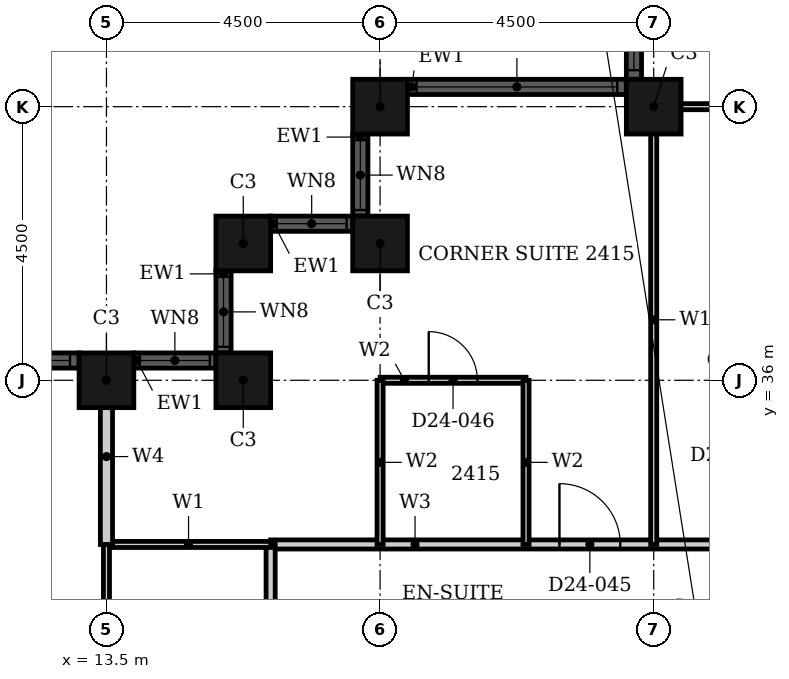
"""IFC4 building model, lengths in metres.
Left out: names, types, materials, properties, quantities, classifications, styles, units other than length and angle.
Written with IfcOpenShell. Run it as: python <this file> out.ifc"""

import sys

from ifc_helpers import new_model, si_unit, direction, frame, frame_2d, origin, origin_2d, place, context, subcontext, project, spatial, rectangle, hollow_rectangle, extrude, element, fill, save


model = new_model("IFC4")
c1 = context("Model", 3, precision=1e-05, world=origin(), true_north=direction((0.0, 1.0)))
c2 = subcontext(c1, "Body", "Model", "MODEL_VIEW")
j1 = project(units=[si_unit("LENGTHUNIT", "METRE"), si_unit("PLANEANGLEUNIT", "RADIAN")], contexts=[c1])
p1 = place(None, origin())
s1 = spatial("IfcSite", under=j1, at=p1, CompositionType="ELEMENT")
p2 = place(p1, origin())
s2 = spatial("IfcBuilding", under=s1, at=p2, CompositionType="ELEMENT")
p3 = place(p2, frame((0.0, 0.0, 100.8)))
s3 = spatial("IfcBuildingStorey", under=s2, at=p3, CompositionType="ELEMENT", Elevation=100.8)
for number, where, z_axis, x_axis in (
    (1, (22.5, 40.5, 0.0), (0.0, 0.0, 1.0), (1.0, 0.0, 0.0)),
    (2, (18.0, 40.5, 0.0), (0.0, 0.0, 1.0), (1.0, 0.0, 0.0)),
    (3, (18.0, 38.25, 0.0), (0.0, 0.0, 1.0), (1.0, 0.0, 0.0)),
    (4, (15.75, 38.25, 0.0), (0.0, 0.0, 1.0), (1.0, 0.0, 0.0)),
    (5, (15.75, 36.0, 0.0), (0.0, 0.0, 1.0), (1.0, 0.0, 0.0)),
    (6, (13.5, 36.0, 0.0), (0.0, 0.0, 1.0), (1.0, 0.0, 0.0)),
):
    element("IfcColumn", number, at=place(p3, frame(where, z_axis=z_axis, x_axis=x_axis)), inside=s3, PredefinedType="COLUMN", context=c2, shape_type="SweptSolid", body=[
        extrude(hollow_rectangle(XDim=0.9, YDim=0.9, WallThickness=0.028, at=origin_2d()), origin(), (0.0, 0.0, 1.0), 3.6),
    ])
p4 = place(p3, frame((22.175, 49.05, 0.0), z_axis=(0.0, 0.0, 1.0), x_axis=(0.0, -1.0, 0.0)))
e7 = element("IfcWall", 7, at=p4, inside=s3, PredefinedType="SOLIDWALL", context=c2, shape_type="SweptSolid", body=[
    extrude(rectangle(XDim=8.1, YDim=0.25, at=frame_2d((4.05, 0.0))), origin(), (0.0, 0.0, 1.0), 3.6),
])
p5 = place(p4, frame((0.15, 0.0, 0.9)))
e8 = element("IfcOpeningElement", 8, at=p5, cuts=e7, PredefinedType="OPENING", context=c2, shape_type="SweptSolid", body=[
    extrude(rectangle(XDim=3.3, YDim=2.08, at=frame_2d((1.65, 1.04))), frame((0.0, 0.135, 0.0), z_axis=(0.0, -1.0, 0.0), x_axis=(1.0, 0.0, 0.0)), (0.0, 0.0, 1.0), 0.27),
])
p6 = place(p4, frame((4.65, 0.0, 0.9)))
e9 = element("IfcOpeningElement", 9, at=p6, cuts=e7, PredefinedType="OPENING", context=c2, shape_type="SweptSolid", body=[
    extrude(rectangle(XDim=3.3, YDim=2.08, at=frame_2d((1.65, 1.04))), frame((0.0, 0.135, 0.0), z_axis=(0.0, -1.0, 0.0), x_axis=(1.0, 0.0, 0.0)), (0.0, 0.0, 1.0), 0.27),
])
p7 = place(p3, frame((22.05, 40.825, 0.0), z_axis=(0.0, 0.0, 1.0), x_axis=(-1.0, 0.0, 0.0)))
e10 = element("IfcWall", 10, at=p7, inside=s3, PredefinedType="SOLIDWALL", context=c2, shape_type="SweptSolid", body=[
    extrude(rectangle(XDim=3.6, YDim=0.25, at=frame_2d((1.8, 0.0))), origin(), (0.0, 0.0, 1.0), 3.6),
])
p8 = place(p7, frame((0.15, 0.0, 0.9)))
e11 = element("IfcOpeningElement", 11, at=p8, cuts=e10, PredefinedType="OPENING", context=c2, shape_type="SweptSolid", body=[
    extrude(rectangle(XDim=3.3, YDim=2.08, at=frame_2d((1.65, 1.04))), frame((0.0, 0.135, 0.0), z_axis=(0.0, -1.0, 0.0), x_axis=(1.0, 0.0, 0.0)), (0.0, 0.0, 1.0), 0.27),
])
p9 = place(p3, frame((17.675, 40.05, 0.0), z_axis=(0.0, 0.0, 1.0), x_axis=(0.0, -1.0, 0.0)))
e12 = element("IfcWall", 12, at=p9, inside=s3, PredefinedType="SOLIDWALL", context=c2, shape_type="SweptSolid", body=[
    extrude(rectangle(XDim=1.35, YDim=0.25, at=frame_2d((0.675, 0.0))), origin(), (0.0, 0.0, 1.0), 3.6),
])
p10 = place(p9, frame((0.1, 0.0, 0.9)))
e13 = element("IfcOpeningElement", 13, at=p10, cuts=e12, PredefinedType="OPENING", context=c2, shape_type="SweptSolid", body=[
    extrude(rectangle(XDim=1.15, YDim=2.08, at=frame_2d((0.575, 1.04))), frame((0.0, 0.135, 0.0), z_axis=(0.0, -1.0, 0.0), x_axis=(1.0, 0.0, 0.0)), (0.0, 0.0, 1.0), 0.27),
])
p11 = place(p3, frame((17.55, 38.575, 0.0), z_axis=(0.0, 0.0, 1.0), x_axis=(-1.0, 0.0, 0.0)))
e14 = element("IfcWall", 14, at=p11, inside=s3, PredefinedType="SOLIDWALL", context=c2, shape_type="SweptSolid", body=[
    extrude(rectangle(XDim=1.35, YDim=0.25, at=frame_2d((0.675, 0.0))), origin(), (0.0, 0.0, 1.0), 3.6),
])
p12 = place(p11, frame((0.1, 0.0, 0.9)))
e15 = element("IfcOpeningElement", 15, at=p12, cuts=e14, PredefinedType="OPENING", context=c2, shape_type="SweptSolid", body=[
    extrude(rectangle(XDim=1.15, YDim=2.08, at=frame_2d((0.575, 1.04))), frame((0.0, 0.135, 0.0), z_axis=(0.0, -1.0, 0.0), x_axis=(1.0, 0.0, 0.0)), (0.0, 0.0, 1.0), 0.27),
])
p13 = place(p3, frame((15.425, 37.8, 0.0), z_axis=(0.0, 0.0, 1.0), x_axis=(0.0, -1.0, 0.0)))
e16 = element("IfcWall", 16, at=p13, inside=s3, PredefinedType="SOLIDWALL", context=c2, shape_type="SweptSolid", body=[
    extrude(rectangle(XDim=1.35, YDim=0.25, at=frame_2d((0.675, 0.0))), origin(), (0.0, 0.0, 1.0), 3.6),
])
p14 = place(p13, frame((0.1, 0.0, 0.9)))
e17 = element("IfcOpeningElement", 17, at=p14, cuts=e16, PredefinedType="OPENING", context=c2, shape_type="SweptSolid", body=[
    extrude(rectangle(XDim=1.15, YDim=2.08, at=frame_2d((0.575, 1.04))), frame((0.0, 0.135, 0.0), z_axis=(0.0, -1.0, 0.0), x_axis=(1.0, 0.0, 0.0)), (0.0, 0.0, 1.0), 0.27),
])
p15 = place(p3, frame((15.3, 36.325, 0.0), z_axis=(0.0, 0.0, 1.0), x_axis=(-1.0, 0.0, 0.0)))
e18 = element("IfcWall", 18, at=p15, inside=s3, PredefinedType="SOLIDWALL", context=c2, shape_type="SweptSolid", body=[
    extrude(rectangle(XDim=1.35, YDim=0.25, at=frame_2d((0.675, 0.0))), origin(), (0.0, 0.0, 1.0), 3.6),
])
p16 = place(p15, frame((0.1, 0.0, 0.9)))
e19 = element("IfcOpeningElement", 19, at=p16, cuts=e18, PredefinedType="OPENING", context=c2, shape_type="SweptSolid", body=[
    extrude(rectangle(XDim=1.15, YDim=2.08, at=frame_2d((0.575, 1.04))), frame((0.0, 0.135, 0.0), z_axis=(0.0, -1.0, 0.0), x_axis=(1.0, 0.0, 0.0)), (0.0, 0.0, 1.0), 0.27),
])
p17 = place(p3, frame((13.05, 36.325, 0.0), z_axis=(0.0, 0.0, 1.0), x_axis=(-1.0, 0.0, 0.0)))
e20 = element("IfcWall", 20, at=p17, inside=s3, PredefinedType="SOLIDWALL", context=c2, shape_type="SweptSolid", body=[
    extrude(rectangle(XDim=8.1, YDim=0.25, at=frame_2d((4.05, 0.0))), origin(), (0.0, 0.0, 1.0), 3.6),
])
p18 = place(p17, frame((0.15, 0.0, 0.9)))
e21 = element("IfcOpeningElement", 21, at=p18, cuts=e20, PredefinedType="OPENING", context=c2, shape_type="SweptSolid", body=[
    extrude(rectangle(XDim=3.3, YDim=2.08, at=frame_2d((1.65, 1.04))), frame((0.0, 0.135, 0.0), z_axis=(0.0, -1.0, 0.0), x_axis=(1.0, 0.0, 0.0)), (0.0, 0.0, 1.0), 0.27),
])
p19 = place(p17, frame((4.65, 0.0, 0.9)))
e22 = element("IfcOpeningElement", 22, at=p19, cuts=e20, PredefinedType="OPENING", context=c2, shape_type="SweptSolid", body=[
    extrude(rectangle(XDim=3.3, YDim=2.08, at=frame_2d((1.65, 1.04))), frame((0.0, 0.135, 0.0), z_axis=(0.0, -1.0, 0.0), x_axis=(1.0, 0.0, 0.0)), (0.0, 0.0, 1.0), 0.27),
])
p20 = place(p3, frame((16.2, 33.3, 0.0), z_axis=(0.0, 0.0, 1.0), x_axis=(1.0, 0.0, 0.0)))
e23 = element("IfcWall", 23, at=p20, inside=s3, PredefinedType="PARTITIONING", context=c2, shape_type="SweptSolid", body=[
    extrude(rectangle(XDim=15.3, YDim=0.15, at=frame_2d((7.65, 0.0))), origin(), (0.0, 0.0, 1.0), 3.3),
])
p21 = place(p20, frame((4.75, 0.0, 0.0)))
e24 = element("IfcOpeningElement", 24, at=p21, cuts=e23, PredefinedType="OPENING", context=c2, shape_type="SweptSolid", body=[
    extrude(rectangle(XDim=1.0, YDim=2.1, at=frame_2d((0.5, 1.05))), frame((0.0, 0.085, 0.0), z_axis=(0.0, -1.0, 0.0), x_axis=(1.0, 0.0, 0.0)), (0.0, 0.0, 1.0), 0.17),
])
p22 = place(p20, frame((7.65, 0.0, 0.0)))
e25 = element("IfcOpeningElement", 25, at=p22, cuts=e23, PredefinedType="OPENING", context=c2, shape_type="SweptSolid", body=[
    extrude(rectangle(XDim=0.9, YDim=2.1, at=frame_2d((0.45, 1.05))), frame((0.0, 0.085, 0.0), z_axis=(0.0, -1.0, 0.0), x_axis=(1.0, 0.0, 0.0)), (0.0, 0.0, 1.0), 0.17),
])
p23 = place(p20, frame((12.15, 0.0, 0.0)))
e26 = element("IfcOpeningElement", 26, at=p23, cuts=e23, PredefinedType="OPENING", context=c2, shape_type="SweptSolid", body=[
    extrude(rectangle(XDim=0.9, YDim=2.1, at=frame_2d((0.45, 1.05))), frame((0.0, 0.085, 0.0), z_axis=(0.0, -1.0, 0.0), x_axis=(1.0, 0.0, 0.0)), (0.0, 0.0, 1.0), 0.17),
])
p24 = place(p3, frame((16.2, 27.0, 0.0), z_axis=(0.0, 0.0, 1.0), x_axis=(0.0, 1.0, 0.0)))
e27 = element("IfcWall", 27, at=p24, inside=s3, PredefinedType="PARTITIONING", context=c2, shape_type="SweptSolid", body=[
    extrude(rectangle(XDim=6.3, YDim=0.15, at=frame_2d((3.15, 0.0))), origin(), (0.0, 0.0, 1.0), 3.3),
])
p25 = place(p24, frame((2.55, 0.0, 0.0)))
e28 = element("IfcOpeningElement", 28, at=p25, cuts=e27, PredefinedType="OPENING", context=c2, shape_type="SweptSolid", body=[
    extrude(rectangle(XDim=0.9, YDim=2.1, at=frame_2d((0.45, 1.05))), frame((0.0, 0.085, 0.0), z_axis=(0.0, -1.0, 0.0), x_axis=(1.0, 0.0, 0.0)), (0.0, 0.0, 1.0), 0.17),
])
p26 = place(p3, frame((13.5, 33.3, 0.0), z_axis=(0.0, 0.0, 1.0), x_axis=(1.0, 0.0, 0.0)))
e29 = element("IfcWall", 29, at=p26, inside=s3, PredefinedType="PARTITIONING", context=c2, shape_type="SweptSolid", body=[
    extrude(rectangle(XDim=2.7, YDim=0.1, at=frame_2d((1.35, 0.0))), origin(), (0.0, 0.0, 1.0), 3.3),
])
p27 = place(p3, frame((22.31, 40.5, 0.0), z_axis=(0.0, 0.0, 1.0), x_axis=(1.0, 0.0, 0.0)))
e30 = element("IfcWall", 30, at=p27, inside=s3, PredefinedType="PARTITIONING", context=c2, shape_type="SweptSolid", body=[
    extrude(rectangle(XDim=9.19, YDim=0.1, at=frame_2d((4.595, 0.0))), origin(), (0.0, 0.0, 1.0), 2.38),
])
p28 = place(p3, frame((13.5, 27.0, 0.0), z_axis=(0.0, 0.0, 1.0), x_axis=(0.0, 1.0, 0.0)))
e31 = element("IfcWall", 31, at=p28, inside=s3, PredefinedType="PARTITIONING", context=c2, shape_type="SweptSolid", body=[
    extrude(rectangle(XDim=6.3, YDim=0.1, at=frame_2d((3.15, 0.0))), origin(), (0.0, 0.0, 1.0), 2.38),
])
p29 = place(p3, frame((22.5, 33.3, 0.0), z_axis=(0.0, 0.0, 1.0), x_axis=(0.0, 1.0, 0.0)))
e32 = element("IfcWall", 32, at=p29, inside=s3, PredefinedType="PARTITIONING", context=c2, shape_type="SweptSolid", body=[
    extrude(rectangle(XDim=7.39, YDim=0.1, at=frame_2d((3.695, 0.0))), origin(), (0.0, 0.0, 1.0), 3.3),
])
p30 = place(p3, frame((13.5, 33.3, 0.0), z_axis=(0.0, 0.0, 1.0), x_axis=(0.0, 1.0, 0.0)))
e33 = element("IfcWall", 33, at=p30, inside=s3, PredefinedType="PARTITIONING", context=c2, shape_type="SweptSolid", body=[
    extrude(rectangle(XDim=2.89, YDim=0.2, at=frame_2d((1.445, 0.0))), origin(), (0.0, 0.0, 1.0), 2.38),
])
p31 = place(p3, frame((18.0, 36.0, 0.0), z_axis=(0.0, 0.0, 1.0), x_axis=(1.0, 0.0, 0.0)))
e34 = element("IfcWall", 34, at=p31, inside=s3, PredefinedType="PARTITIONING", context=c2, shape_type="SweptSolid", body=[
    extrude(rectangle(XDim=2.4, YDim=0.1, at=frame_2d((1.2, 0.0))), origin(), (0.0, 0.0, 1.0), 3.3),
])
p32 = place(p31, frame((0.8, 0.0, 0.0)))
e35 = element("IfcOpeningElement", 35, at=p32, cuts=e34, PredefinedType="OPENING", context=c2, shape_type="SweptSolid", body=[
    extrude(rectangle(XDim=0.8, YDim=2.1, at=frame_2d((0.4, 1.05))), frame((0.0, 0.06, 0.0), z_axis=(0.0, -1.0, 0.0), x_axis=(1.0, 0.0, 0.0)), (0.0, 0.0, 1.0), 0.12),
])
for number, where, z_axis, x_axis in (
    (36, (18.0, 33.3, 0.0), (0.0, 0.0, 1.0), (0.0, 1.0, 0.0)),
    (37, (20.4, 33.3, 0.0), (0.0, 0.0, 1.0), (0.0, 1.0, 0.0)),
):
    element("IfcWall", number, at=place(p3, frame(where, z_axis=z_axis, x_axis=x_axis)), inside=s3, PredefinedType="PARTITIONING", context=c2, shape_type="SweptSolid", body=[
        extrude(rectangle(XDim=2.7, YDim=0.1, at=frame_2d((1.35, 0.0))), origin(), (0.0, 0.0, 1.0), 3.3),
    ])
p33 = place(p6, origin())
e38 = element("IfcWindow", 38, at=p33, inside=s3, PartitioningType="SINGLE_PANEL", PredefinedType="WINDOW", context=c2, shape_type="SweptSolid", body=[
    extrude(rectangle(XDim=3.3, YDim=2.08, at=frame_2d((1.65, 1.04))), frame((0.0, 0.03, 0.0), z_axis=(0.0, -1.0, 0.0), x_axis=(1.0, 0.0, 0.0)), (0.0, 0.0, 1.0), 0.06),
])
fill(e9, e38)
p34 = place(p8, origin())
e39 = element("IfcWindow", 39, at=p34, inside=s3, PartitioningType="SINGLE_PANEL", PredefinedType="WINDOW", context=c2, shape_type="SweptSolid", body=[
    extrude(rectangle(XDim=3.3, YDim=2.08, at=frame_2d((1.65, 1.04))), frame((0.0, 0.03, 0.0), z_axis=(0.0, -1.0, 0.0), x_axis=(1.0, 0.0, 0.0)), (0.0, 0.0, 1.0), 0.06),
])
fill(e11, e39)
p35 = place(p10, origin())
e40 = element("IfcWindow", 40, at=p35, inside=s3, PartitioningType="SINGLE_PANEL", PredefinedType="WINDOW", context=c2, shape_type="SweptSolid", body=[
    extrude(rectangle(XDim=1.15, YDim=2.08, at=frame_2d((0.575, 1.04))), frame((0.0, 0.03, 0.0), z_axis=(0.0, -1.0, 0.0), x_axis=(1.0, 0.0, 0.0)), (0.0, 0.0, 1.0), 0.06),
])
fill(e13, e40)
p36 = place(p12, origin())
e41 = element("IfcWindow", 41, at=p36, inside=s3, PartitioningType="SINGLE_PANEL", PredefinedType="WINDOW", context=c2, shape_type="SweptSolid", body=[
    extrude(rectangle(XDim=1.15, YDim=2.08, at=frame_2d((0.575, 1.04))), frame((0.0, 0.03, 0.0), z_axis=(0.0, -1.0, 0.0), x_axis=(1.0, 0.0, 0.0)), (0.0, 0.0, 1.0), 0.06),
])
fill(e15, e41)
p37 = place(p14, origin())
e42 = element("IfcWindow", 42, at=p37, inside=s3, PartitioningType="SINGLE_PANEL", PredefinedType="WINDOW", context=c2, shape_type="SweptSolid", body=[
    extrude(rectangle(XDim=1.15, YDim=2.08, at=frame_2d((0.575, 1.04))), frame((0.0, 0.03, 0.0), z_axis=(0.0, -1.0, 0.0), x_axis=(1.0, 0.0, 0.0)), (0.0, 0.0, 1.0), 0.06),
])
fill(e17, e42)
p38 = place(p16, origin())
e43 = element("IfcWindow", 43, at=p38, inside=s3, PartitioningType="SINGLE_PANEL", PredefinedType="WINDOW", context=c2, shape_type="SweptSolid", body=[
    extrude(rectangle(XDim=1.15, YDim=2.08, at=frame_2d((0.575, 1.04))), frame((0.0, 0.03, 0.0), z_axis=(0.0, -1.0, 0.0), x_axis=(1.0, 0.0, 0.0)), (0.0, 0.0, 1.0), 0.06),
])
fill(e19, e43)
p39 = place(p18, origin())
e44 = element("IfcWindow", 44, at=p39, inside=s3, PartitioningType="SINGLE_PANEL", PredefinedType="WINDOW", context=c2, shape_type="SweptSolid", body=[
    extrude(rectangle(XDim=3.3, YDim=2.08, at=frame_2d((1.65, 1.04))), frame((0.0, 0.03, 0.0), z_axis=(0.0, -1.0, 0.0), x_axis=(1.0, 0.0, 0.0)), (0.0, 0.0, 1.0), 0.06),
])
fill(e21, e44)
p40 = place(p21, origin())
e45 = element("IfcDoor", 45, at=p40, inside=s3, OperationType="SINGLE_SWING_RIGHT", PredefinedType="DOOR", context=c2, shape_type="SweptSolid", body=[
    extrude(rectangle(XDim=1.0, YDim=2.1, at=frame_2d((0.5, 1.05))), frame((0.0, 0.025, 0.0), z_axis=(0.0, -1.0, 0.0), x_axis=(1.0, 0.0, 0.0)), (0.0, 0.0, 1.0), 0.05),
])
fill(e24, e45)
p41 = place(p32, origin())
e46 = element("IfcDoor", 46, at=p41, inside=s3, OperationType="SINGLE_SWING_RIGHT", PredefinedType="DOOR", context=c2, shape_type="SweptSolid", body=[
    extrude(rectangle(XDim=0.8, YDim=2.1, at=frame_2d((0.4, 1.05))), frame((0.0, 0.025, 0.0), z_axis=(0.0, -1.0, 0.0), x_axis=(1.0, 0.0, 0.0)), (0.0, 0.0, 1.0), 0.05),
])
fill(e35, e46)
save(model, sys.argv[1])
